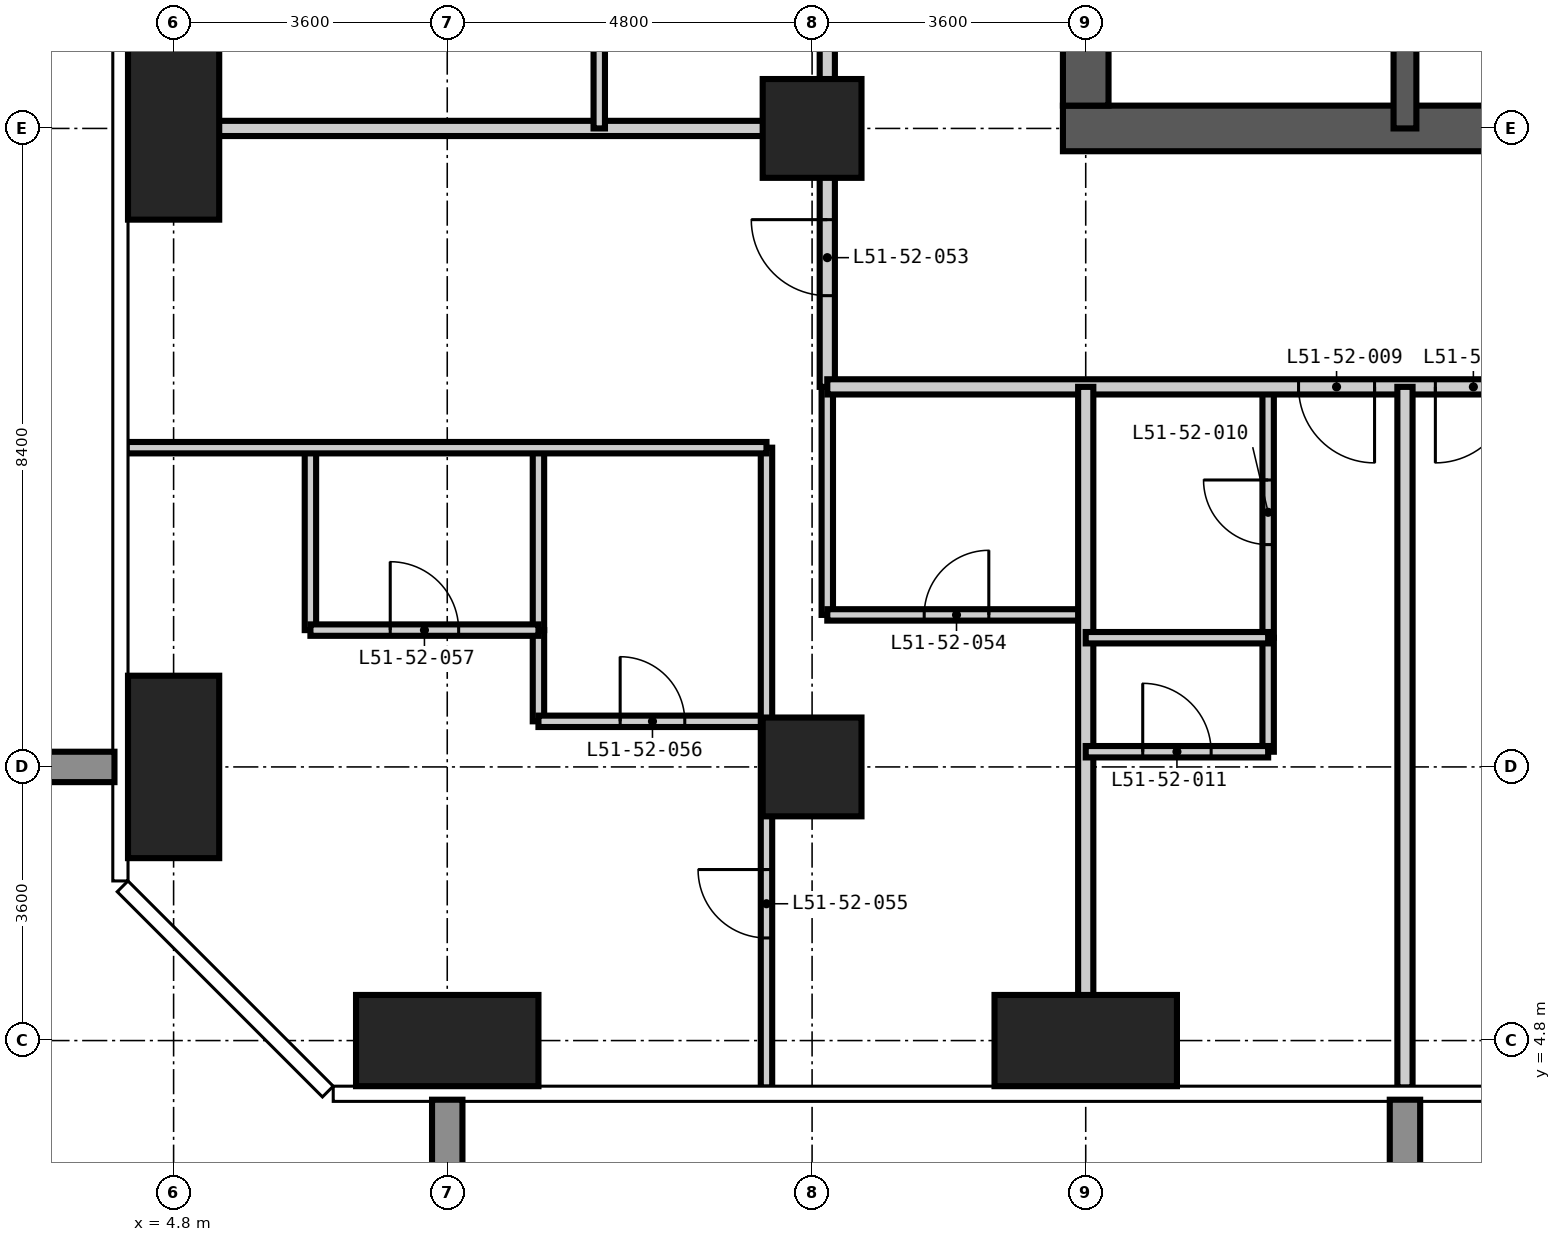
"""IFC4 building model, lengths in metres.
Left out: names, types, materials, properties, quantities, classifications, styles, units other than length and angle.
Written with IfcOpenShell. Run it as: python <this file> out.ifc"""

import sys

from ifc_helpers import new_model, si_unit, direction, frame, frame_2d, origin, origin_2d, place, context, subcontext, project, spatial, rectangle, extrude, element, fill, save


model = new_model("IFC4")
c1 = context("Model", 3, precision=1e-05, world=origin(), true_north=direction((0.0, 1.0)))
c2 = subcontext(c1, "Body", "Model", "MODEL_VIEW")
j1 = project(units=[si_unit("LENGTHUNIT", "METRE"), si_unit("PLANEANGLEUNIT", "RADIAN")], contexts=[c1])
p1 = place(None, origin())
s1 = spatial("IfcSite", under=j1, at=p1, CompositionType="ELEMENT")
p2 = place(p1, origin())
s2 = spatial("IfcBuilding", under=s1, at=p2, CompositionType="ELEMENT")
p3 = place(p2, frame((0.0, 0.0, 198.6)))
s3 = spatial("IfcBuildingStorey", under=s2, at=p3, CompositionType="ELEMENT", Elevation=198.6)
for number, where, z_axis, x_axis in (
    (1, (4.8, 8.4, -0.35), (0.0, 0.0, 1.0), (1.0, 0.0, 0.0)),
    (2, (4.8, 16.8, -0.35), (0.0, 0.0, 1.0), (1.0, 0.0, 0.0)),
):
    element("IfcColumn", number, at=place(p3, frame(where, z_axis=z_axis, x_axis=x_axis)), inside=s3, PredefinedType="COLUMN", context=c2, shape_type="SweptSolid", body=[
        extrude(rectangle(XDim=1.2, YDim=2.4, at=origin_2d()), origin(), (0.0, 0.0, 1.0), 3.6),
    ])
p4 = place(p3, frame((8.4, 4.8, -0.35), z_axis=(0.0, 0.0, 1.0), x_axis=(1.0, 0.0, 0.0)))
e3 = element("IfcColumn", 3, at=p4, inside=s3, PredefinedType="COLUMN", context=c2, shape_type="SweptSolid", body=[
    extrude(rectangle(XDim=2.4, YDim=1.2, at=origin_2d()), origin(), (0.0, 0.0, 1.0), 3.6),
])
for number, where, z_axis, x_axis in (
    (4, (13.2, 8.4, -0.35), (0.0, 0.0, 1.0), (1.0, 0.0, 0.0)),
    (5, (13.2, 16.8, -0.35), (0.0, 0.0, 1.0), (1.0, 0.0, 0.0)),
):
    element("IfcColumn", number, at=place(p3, frame(where, z_axis=z_axis, x_axis=x_axis)), inside=s3, PredefinedType="COLUMN", context=c2, shape_type="SweptSolid", body=[
        extrude(rectangle(XDim=1.3, YDim=1.3, at=origin_2d()), origin(), (0.0, 0.0, 1.0), 3.6),
    ])
p5 = place(p3, frame((16.8, 4.8, -0.35), z_axis=(0.0, 0.0, 1.0), x_axis=(1.0, 0.0, 0.0)))
e6 = element("IfcColumn", 6, at=p5, inside=s3, PredefinedType="COLUMN", context=c2, shape_type="SweptSolid", body=[
    extrude(rectangle(XDim=2.4, YDim=1.2, at=origin_2d()), origin(), (0.0, 0.0, 1.0), 3.6),
])
p6 = place(p3, frame((16.5, 16.8, -0.35), z_axis=(0.0, 0.0, 1.0), x_axis=(1.0, 0.0, 0.0)))
e7 = element("IfcWall", 7, at=p6, inside=s3, PredefinedType="SHEAR", context=c2, shape_type="SweptSolid", body=[
    extrude(rectangle(XDim=25.8, YDim=0.6, at=frame_2d((12.9, 0.0))), origin(), (0.0, 0.0, 1.0), 3.6),
])
p7 = place(p6, frame((12.4, 0.0, 0.35)))
e8 = element("IfcOpeningElement", 8, at=p7, cuts=e7, PredefinedType="OPENING", context=c2, shape_type="SweptSolid", body=[
    extrude(rectangle(XDim=1.0, YDim=2.1, at=frame_2d((0.5, 1.05))), frame((0.0, 0.31, 0.0), z_axis=(0.0, -1.0, 0.0), x_axis=(1.0, 0.0, 0.0)), (0.0, 0.0, 1.0), 0.62),
])
p8 = place(p6, frame((18.7, 0.0, 0.35)))
e9 = element("IfcOpeningElement", 9, at=p8, cuts=e7, PredefinedType="OPENING", context=c2, shape_type="SweptSolid", body=[
    extrude(rectangle(XDim=1.0, YDim=2.1, at=frame_2d((0.5, 1.05))), frame((0.0, 0.31, 0.0), z_axis=(0.0, -1.0, 0.0), x_axis=(1.0, 0.0, 0.0)), (0.0, 0.0, 1.0), 0.62),
])
p9 = place(p3, frame((16.8, 41.7, -0.35), z_axis=(0.0, 0.0, 1.0), x_axis=(0.0, -1.0, 0.0)))
e10 = element("IfcWall", 10, at=p9, inside=s3, PredefinedType="SHEAR", context=c2, shape_type="SweptSolid", body=[
    extrude(rectangle(XDim=24.6, YDim=0.6, at=frame_2d((12.3, 0.0))), origin(), (0.0, 0.0, 1.0), 3.6),
])
p10 = place(p9, frame((11.4, 0.0, 0.35)))
e11 = element("IfcOpeningElement", 11, at=p10, cuts=e10, PredefinedType="OPENING", context=c2, shape_type="SweptSolid", body=[
    extrude(rectangle(XDim=1.8, YDim=2.2, at=frame_2d((0.9, 1.1))), frame((0.0, 0.31, 0.0), z_axis=(0.0, -1.0, 0.0), x_axis=(1.0, 0.0, 0.0)), (0.0, 0.0, 1.0), 0.62),
])
p11 = place(p9, frame((20.2, 0.0, 0.35)))
e12 = element("IfcOpeningElement", 12, at=p11, cuts=e10, PredefinedType="OPENING", context=c2, shape_type="SweptSolid", body=[
    extrude(rectangle(XDim=1.0, YDim=2.1, at=frame_2d((0.5, 1.05))), frame((0.0, 0.31, 0.0), z_axis=(0.0, -1.0, 0.0), x_axis=(1.0, 0.0, 0.0)), (0.0, 0.0, 1.0), 0.62),
])
p12 = place(p9, frame((5.5, 0.0, 0.35)))
e13 = element("IfcOpeningElement", 13, at=p12, cuts=e10, PredefinedType="OPENING", context=c2, shape_type="SweptSolid", body=[
    extrude(rectangle(XDim=1.0, YDim=2.1, at=frame_2d((0.5, 1.05))), frame((0.0, 0.31, 0.0), z_axis=(0.0, -1.0, 0.0), x_axis=(1.0, 0.0, 0.0)), (0.0, 0.0, 1.0), 0.62),
])
p13 = place(p3, frame((21.0, 16.8, -0.35), z_axis=(0.0, 0.0, 1.0), x_axis=(0.0, 1.0, 0.0)))
e14 = element("IfcWall", 14, at=p13, inside=s3, PredefinedType="SHEAR", context=c2, shape_type="SweptSolid", body=[
    extrude(rectangle(XDim=2.8, YDim=0.3, at=frame_2d((1.4, 0.0))), origin(), (0.0, 0.0, 1.0), 3.6),
])
p14 = place(p3, frame((9.6, 9.0, 0.0), z_axis=(0.0, 0.0, 1.0), x_axis=(0.0, 1.0, 0.0)))
e15 = element("IfcWall", 15, at=p14, inside=s3, PredefinedType="PARTITIONING", context=c2, shape_type="SweptSolid", body=[
    extrude(rectangle(XDim=1.2, YDim=0.15, at=frame_2d((0.6, 0.0))), origin(), (0.0, 0.0, 1.0), 3.25),
])
p15 = place(p3, frame((13.4, 10.4, 0.0), z_axis=(0.0, 0.0, 1.0), x_axis=(0.0, 1.0, 0.0)))
e16 = element("IfcWall", 16, at=p15, inside=s3, PredefinedType="PARTITIONING", context=c2, shape_type="SweptSolid", body=[
    extrude(rectangle(XDim=3.0, YDim=0.15, at=frame_2d((1.5, 0.0))), origin(), (0.0, 0.0, 1.0), 3.25),
])
p16 = place(p3, frame((19.2, 10.1, 0.0), z_axis=(0.0, 0.0, 1.0), x_axis=(0.0, 1.0, 0.0)))
e17 = element("IfcWall", 17, at=p16, inside=s3, PredefinedType="PARTITIONING", context=c2, shape_type="SweptSolid", body=[
    extrude(rectangle(XDim=3.3, YDim=0.15, at=frame_2d((1.65, 0.0))), origin(), (0.0, 0.0, 1.0), 3.25),
])
p17 = place(p16, frame((1.225, 0.0, 0.0)))
e18 = element("IfcOpeningElement", 18, at=p17, cuts=e17, PredefinedType="OPENING", context=c2, shape_type="SweptSolid", body=[
    extrude(rectangle(XDim=0.85, YDim=2.1, at=frame_2d((0.425, 1.05))), frame((0.0, 0.085, 0.0), z_axis=(0.0, -1.0, 0.0), x_axis=(1.0, 0.0, 0.0)), (0.0, 0.0, 1.0), 0.17),
])
p18 = place(p3, frame((9.6, 9.0, 0.0), z_axis=(0.0, 0.0, 1.0), x_axis=(1.0, 0.0, 0.0)))
e19 = element("IfcWall", 19, at=p18, inside=s3, PredefinedType="PARTITIONING", context=c2, shape_type="SweptSolid", body=[
    extrude(rectangle(XDim=3.0, YDim=0.15, at=frame_2d((1.5, 0.0))), origin(), (0.0, 0.0, 1.0), 3.25),
])
p19 = place(p18, frame((1.075, 0.0, 0.0)))
e20 = element("IfcOpeningElement", 20, at=p19, cuts=e19, PredefinedType="OPENING", context=c2, shape_type="SweptSolid", body=[
    extrude(rectangle(XDim=0.85, YDim=2.1, at=frame_2d((0.425, 1.05))), frame((0.0, 0.085, 0.0), z_axis=(0.0, -1.0, 0.0), x_axis=(1.0, 0.0, 0.0)), (0.0, 0.0, 1.0), 0.17),
])
p20 = place(p3, frame((13.4, 10.4, 0.0), z_axis=(0.0, 0.0, 1.0), x_axis=(1.0, 0.0, 0.0)))
e21 = element("IfcWall", 21, at=p20, inside=s3, PredefinedType="PARTITIONING", context=c2, shape_type="SweptSolid", body=[
    extrude(rectangle(XDim=3.4, YDim=0.15, at=frame_2d((1.7, 0.0))), origin(), (0.0, 0.0, 1.0), 3.25),
])
p21 = place(p20, frame((1.275, 0.0, 0.0)))
e22 = element("IfcOpeningElement", 22, at=p21, cuts=e21, PredefinedType="OPENING", context=c2, shape_type="SweptSolid", body=[
    extrude(rectangle(XDim=0.85, YDim=2.1, at=frame_2d((0.425, 1.05))), frame((0.0, 0.085, 0.0), z_axis=(0.0, -1.0, 0.0), x_axis=(1.0, 0.0, 0.0)), (0.0, 0.0, 1.0), 0.17),
])
p22 = place(p3, frame((13.4, 13.4, 0.0), z_axis=(0.0, 0.0, 1.0), x_axis=(0.0, 1.0, 0.0)))
e23 = element("IfcWall", 23, at=p22, inside=s3, PredefinedType="PARTITIONING", context=c2, shape_type="SweptSolid", body=[
    extrude(rectangle(XDim=31.4, YDim=0.2, at=frame_2d((15.7, 0.0))), origin(), (0.0, 0.0, 1.0), 3.25),
])
p23 = place(p22, frame((6.2, 0.0, 0.0)))
e24 = element("IfcOpeningElement", 24, at=p23, cuts=e23, PredefinedType="OPENING", context=c2, shape_type="SweptSolid", body=[
    extrude(rectangle(XDim=1.0, YDim=2.2, at=frame_2d((0.5, 1.1))), frame((0.0, 0.11, 0.0), z_axis=(0.0, -1.0, 0.0), x_axis=(1.0, 0.0, 0.0)), (0.0, 0.0, 1.0), 0.22),
])
p24 = place(p22, frame((14.6, 0.0, 0.0)))
e25 = element("IfcOpeningElement", 25, at=p24, cuts=e23, PredefinedType="OPENING", context=c2, shape_type="SweptSolid", body=[
    extrude(rectangle(XDim=1.0, YDim=2.2, at=frame_2d((0.5, 1.1))), frame((0.0, 0.11, 0.0), z_axis=(0.0, -1.0, 0.0), x_axis=(1.0, 0.0, 0.0)), (0.0, 0.0, 1.0), 0.22),
])
p25 = place(p22, frame((23.0, 0.0, 0.0)))
e26 = element("IfcOpeningElement", 26, at=p25, cuts=e23, PredefinedType="OPENING", context=c2, shape_type="SweptSolid", body=[
    extrude(rectangle(XDim=1.0, YDim=2.2, at=frame_2d((0.5, 1.1))), frame((0.0, 0.11, 0.0), z_axis=(0.0, -1.0, 0.0), x_axis=(1.0, 0.0, 0.0)), (0.0, 0.0, 1.0), 0.22),
])
p26 = place(p22, frame((1.2, 0.0, 0.0)))
e27 = element("IfcOpeningElement", 27, at=p26, cuts=e23, PredefinedType="OPENING", context=c2, shape_type="SweptSolid", body=[
    extrude(rectangle(XDim=1.0, YDim=2.2, at=frame_2d((0.5, 1.1))), frame((0.0, 0.11, 0.0), z_axis=(0.0, -1.0, 0.0), x_axis=(1.0, 0.0, 0.0)), (0.0, 0.0, 1.0), 0.22),
])
p27 = place(p22, frame((29.5, 0.0, 0.0)))
e28 = element("IfcOpeningElement", 28, at=p27, cuts=e23, PredefinedType="OPENING", context=c2, shape_type="SweptSolid", body=[
    extrude(rectangle(XDim=1.0, YDim=2.2, at=frame_2d((0.5, 1.1))), frame((0.0, 0.11, 0.0), z_axis=(0.0, -1.0, 0.0), x_axis=(1.0, 0.0, 0.0)), (0.0, 0.0, 1.0), 0.22),
])
p28 = place(p3, frame((44.2, 13.4, 0.0), z_axis=(0.0, 0.0, 1.0), x_axis=(-1.0, 0.0, 0.0)))
e29 = element("IfcWall", 29, at=p28, inside=s3, PredefinedType="PARTITIONING", context=c2, shape_type="SweptSolid", body=[
    extrude(rectangle(XDim=30.8, YDim=0.2, at=frame_2d((15.4, 0.0))), origin(), (0.0, 0.0, 1.0), 3.25),
])
p29 = place(p28, frame((23.6, 0.0, 0.0)))
e30 = element("IfcOpeningElement", 30, at=p29, cuts=e29, PredefinedType="OPENING", context=c2, shape_type="SweptSolid", body=[
    extrude(rectangle(XDim=1.0, YDim=2.2, at=frame_2d((0.5, 1.1))), frame((0.0, 0.11, 0.0), z_axis=(0.0, -1.0, 0.0), x_axis=(1.0, 0.0, 0.0)), (0.0, 0.0, 1.0), 0.22),
])
p30 = place(p28, frame((21.8, 0.0, 0.0)))
e31 = element("IfcOpeningElement", 31, at=p30, cuts=e29, PredefinedType="OPENING", context=c2, shape_type="SweptSolid", body=[
    extrude(rectangle(XDim=1.0, YDim=2.2, at=frame_2d((0.5, 1.1))), frame((0.0, 0.11, 0.0), z_axis=(0.0, -1.0, 0.0), x_axis=(1.0, 0.0, 0.0)), (0.0, 0.0, 1.0), 0.22),
])
p31 = place(p28, frame((15.5, 0.0, 0.0)))
e32 = element("IfcOpeningElement", 32, at=p31, cuts=e29, PredefinedType="OPENING", context=c2, shape_type="SweptSolid", body=[
    extrude(rectangle(XDim=1.0, YDim=2.2, at=frame_2d((0.5, 1.1))), frame((0.0, 0.11, 0.0), z_axis=(0.0, -1.0, 0.0), x_axis=(1.0, 0.0, 0.0)), (0.0, 0.0, 1.0), 0.22),
])
p32 = place(p28, frame((5.0, 0.0, 0.0)))
e33 = element("IfcOpeningElement", 33, at=p32, cuts=e29, PredefinedType="OPENING", context=c2, shape_type="SweptSolid", body=[
    extrude(rectangle(XDim=1.0, YDim=2.2, at=frame_2d((0.5, 1.1))), frame((0.0, 0.11, 0.0), z_axis=(0.0, -1.0, 0.0), x_axis=(1.0, 0.0, 0.0)), (0.0, 0.0, 1.0), 0.22),
])
for number, where, z_axis, x_axis in (
    (34, (16.8, 4.182, 0.0), (0.0, 0.0, 1.0), (0.0, 1.0, 0.0)),
    (35, (21.0, 4.182, 0.0), (0.0, 0.0, 1.0), (0.0, 1.0, 0.0)),
    (36, (4.182, 16.8, 0.0), (0.0, 0.0, 1.0), (1.0, 0.0, 0.0)),
):
    element("IfcWall", number, at=place(p3, frame(where, z_axis=z_axis, x_axis=x_axis)), inside=s3, PredefinedType="PARTITIONING", context=c2, shape_type="SweptSolid", body=[
        extrude(rectangle(XDim=9.218, YDim=0.2, at=frame_2d((4.609, 0.0))), origin(), (0.0, 0.0, 1.0), 3.25),
    ])
for number, where, z_axis, x_axis in (
    (37, (6.6, 10.2, 0.0), (0.0, 0.0, 1.0), (0.0, 1.0, 0.0)),
    (38, (9.6, 10.2, 0.0), (0.0, 0.0, 1.0), (0.0, 1.0, 0.0)),
):
    element("IfcWall", number, at=place(p3, frame(where, z_axis=z_axis, x_axis=x_axis)), inside=s3, PredefinedType="PARTITIONING", context=c2, shape_type="SweptSolid", body=[
        extrude(rectangle(XDim=2.4, YDim=0.15, at=frame_2d((1.2, 0.0))), origin(), (0.0, 0.0, 1.0), 3.25),
    ])
p33 = place(p3, frame((10.4, 16.8, 0.0), z_axis=(0.0, 0.0, 1.0), x_axis=(0.0, 1.0, 0.0)))
e39 = element("IfcWall", 39, at=p33, inside=s3, PredefinedType="PARTITIONING", context=c2, shape_type="SweptSolid", body=[
    extrude(rectangle(XDim=2.4, YDim=0.15, at=frame_2d((1.2, 0.0))), origin(), (0.0, 0.0, 1.0), 3.25),
])
p34 = place(p3, frame((12.6, 4.182, 0.0), z_axis=(0.0, 0.0, 1.0), x_axis=(0.0, 1.0, 0.0)))
e40 = element("IfcWall", 40, at=p34, inside=s3, PredefinedType="PARTITIONING", context=c2, shape_type="SweptSolid", body=[
    extrude(rectangle(XDim=8.418, YDim=0.15, at=frame_2d((4.209, 0.0))), origin(), (0.0, 0.0, 1.0), 3.25),
])
p35 = place(p34, frame((1.968, 0.0, 0.0)))
e41 = element("IfcOpeningElement", 41, at=p35, cuts=e40, PredefinedType="OPENING", context=c2, shape_type="SweptSolid", body=[
    extrude(rectangle(XDim=0.9, YDim=2.1, at=frame_2d((0.45, 1.05))), frame((0.0, 0.085, 0.0), z_axis=(0.0, -1.0, 0.0), x_axis=(1.0, 0.0, 0.0)), (0.0, 0.0, 1.0), 0.17),
])
p36 = place(p3, frame((19.2, 8.6, 0.0), z_axis=(0.0, 0.0, 1.0), x_axis=(0.0, 1.0, 0.0)))
e42 = element("IfcWall", 42, at=p36, inside=s3, PredefinedType="PARTITIONING", context=c2, shape_type="SweptSolid", body=[
    extrude(rectangle(XDim=1.5, YDim=0.15, at=frame_2d((0.75, 0.0))), origin(), (0.0, 0.0, 1.0), 3.25),
])
p37 = place(p3, frame((16.8, 8.6, 0.0), z_axis=(0.0, 0.0, 1.0), x_axis=(1.0, 0.0, 0.0)))
e43 = element("IfcWall", 43, at=p37, inside=s3, PredefinedType="PARTITIONING", context=c2, shape_type="SweptSolid", body=[
    extrude(rectangle(XDim=2.4, YDim=0.15, at=frame_2d((1.2, 0.0))), origin(), (0.0, 0.0, 1.0), 3.25),
])
p38 = place(p37, frame((0.75, 0.0, 0.0)))
e44 = element("IfcOpeningElement", 44, at=p38, cuts=e43, PredefinedType="OPENING", context=c2, shape_type="SweptSolid", body=[
    extrude(rectangle(XDim=0.9, YDim=2.1, at=frame_2d((0.45, 1.05))), frame((0.0, 0.085, 0.0), z_axis=(0.0, -1.0, 0.0), x_axis=(1.0, 0.0, 0.0)), (0.0, 0.0, 1.0), 0.17),
])
p39 = place(p3, frame((16.8, 10.1, 0.0), z_axis=(0.0, 0.0, 1.0), x_axis=(1.0, 0.0, 0.0)))
e45 = element("IfcWall", 45, at=p39, inside=s3, PredefinedType="PARTITIONING", context=c2, shape_type="SweptSolid", body=[
    extrude(rectangle(XDim=2.4, YDim=0.15, at=frame_2d((1.2, 0.0))), origin(), (0.0, 0.0, 1.0), 3.25),
])
p40 = place(p3, frame((6.6, 10.2, 0.0), z_axis=(0.0, 0.0, 1.0), x_axis=(1.0, 0.0, 0.0)))
e46 = element("IfcWall", 46, at=p40, inside=s3, PredefinedType="PARTITIONING", context=c2, shape_type="SweptSolid", body=[
    extrude(rectangle(XDim=3.0, YDim=0.15, at=frame_2d((1.5, 0.0))), origin(), (0.0, 0.0, 1.0), 3.25),
])
p41 = place(p40, frame((1.05, 0.0, 0.0)))
e47 = element("IfcOpeningElement", 47, at=p41, cuts=e46, PredefinedType="OPENING", context=c2, shape_type="SweptSolid", body=[
    extrude(rectangle(XDim=0.9, YDim=2.1, at=frame_2d((0.45, 1.05))), frame((0.0, 0.085, 0.0), z_axis=(0.0, -1.0, 0.0), x_axis=(1.0, 0.0, 0.0)), (0.0, 0.0, 1.0), 0.17),
])
p42 = place(p3, frame((4.182, 12.6, 0.0), z_axis=(0.0, 0.0, 1.0), x_axis=(1.0, 0.0, 0.0)))
e48 = element("IfcWall", 48, at=p42, inside=s3, PredefinedType="PARTITIONING", context=c2, shape_type="SweptSolid", body=[
    extrude(rectangle(XDim=8.418, YDim=0.15, at=frame_2d((4.209, 0.0))), origin(), (0.0, 0.0, 1.0), 3.25),
])
p43 = place(p29, origin())
e49 = element("IfcDoor", 49, at=p43, inside=s3, OperationType="SINGLE_SWING_LEFT", PredefinedType="DOOR", context=c2, shape_type="SweptSolid", body=[
    extrude(rectangle(XDim=1.0, YDim=2.2, at=frame_2d((0.5, 1.1))), frame((0.0, 0.025, 0.0), z_axis=(0.0, -1.0, 0.0), x_axis=(1.0, 0.0, 0.0)), (0.0, 0.0, 1.0), 0.05),
])
fill(e30, e49)
p44 = place(p17, origin())
e50 = element("IfcDoor", 50, at=p44, inside=s3, OperationType="SINGLE_SWING_RIGHT", PredefinedType="DOOR", context=c2, shape_type="SweptSolid", body=[
    extrude(rectangle(XDim=0.85, YDim=2.1, at=frame_2d((0.425, 1.05))), frame((0.0, 0.025, 0.0), z_axis=(0.0, -1.0, 0.0), x_axis=(1.0, 0.0, 0.0)), (0.0, 0.0, 1.0), 0.05),
])
fill(e18, e50)
p45 = place(p38, origin())
e51 = element("IfcDoor", 51, at=p45, inside=s3, OperationType="SINGLE_SWING_LEFT", PredefinedType="DOOR", context=c2, shape_type="SweptSolid", body=[
    extrude(rectangle(XDim=0.9, YDim=2.1, at=frame_2d((0.45, 1.05))), frame((0.0, 0.025, 0.0), z_axis=(0.0, -1.0, 0.0), x_axis=(1.0, 0.0, 0.0)), (0.0, 0.0, 1.0), 0.05),
])
fill(e44, e51)
p46 = place(p30, origin())
e52 = element("IfcDoor", 52, at=p46, inside=s3, OperationType="SINGLE_SWING_RIGHT", PredefinedType="DOOR", context=c2, shape_type="SweptSolid", body=[
    extrude(rectangle(XDim=1.0, YDim=2.2, at=frame_2d((0.5, 1.1))), frame((0.0, 0.025, 0.0), z_axis=(0.0, -1.0, 0.0), x_axis=(1.0, 0.0, 0.0)), (0.0, 0.0, 1.0), 0.05),
])
fill(e31, e52)
p47 = place(p26, origin())
e53 = element("IfcDoor", 53, at=p47, inside=s3, OperationType="SINGLE_SWING_RIGHT", PredefinedType="DOOR", context=c2, shape_type="SweptSolid", body=[
    extrude(rectangle(XDim=1.0, YDim=2.2, at=frame_2d((0.5, 1.1))), frame((0.0, 0.025, 0.0), z_axis=(0.0, -1.0, 0.0), x_axis=(1.0, 0.0, 0.0)), (0.0, 0.0, 1.0), 0.05),
])
fill(e27, e53)
p48 = place(p21, origin())
e54 = element("IfcDoor", 54, at=p48, inside=s3, OperationType="SINGLE_SWING_RIGHT", PredefinedType="DOOR", context=c2, shape_type="SweptSolid", body=[
    extrude(rectangle(XDim=0.85, YDim=2.1, at=frame_2d((0.425, 1.05))), frame((0.0, 0.025, 0.0), z_axis=(0.0, -1.0, 0.0), x_axis=(1.0, 0.0, 0.0)), (0.0, 0.0, 1.0), 0.05),
])
fill(e22, e54)
p49 = place(p35, origin())
e55 = element("IfcDoor", 55, at=p49, inside=s3, OperationType="SINGLE_SWING_RIGHT", PredefinedType="DOOR", context=c2, shape_type="SweptSolid", body=[
    extrude(rectangle(XDim=0.9, YDim=2.1, at=frame_2d((0.45, 1.05))), frame((0.0, 0.025, 0.0), z_axis=(0.0, -1.0, 0.0), x_axis=(1.0, 0.0, 0.0)), (0.0, 0.0, 1.0), 0.05),
])
fill(e41, e55)
p50 = place(p19, origin())
e56 = element("IfcDoor", 56, at=p50, inside=s3, OperationType="SINGLE_SWING_LEFT", PredefinedType="DOOR", context=c2, shape_type="SweptSolid", body=[
    extrude(rectangle(XDim=0.85, YDim=2.1, at=frame_2d((0.425, 1.05))), frame((0.0, 0.025, 0.0), z_axis=(0.0, -1.0, 0.0), x_axis=(1.0, 0.0, 0.0)), (0.0, 0.0, 1.0), 0.05),
])
fill(e20, e56)
p51 = place(p41, origin())
e57 = element("IfcDoor", 57, at=p51, inside=s3, OperationType="SINGLE_SWING_LEFT", PredefinedType="DOOR", context=c2, shape_type="SweptSolid", body=[
    extrude(rectangle(XDim=0.9, YDim=2.1, at=frame_2d((0.45, 1.05))), frame((0.0, 0.025, 0.0), z_axis=(0.0, -1.0, 0.0), x_axis=(1.0, 0.0, 0.0)), (0.0, 0.0, 1.0), 0.05),
])
fill(e47, e57)
save(model, sys.argv[1])
